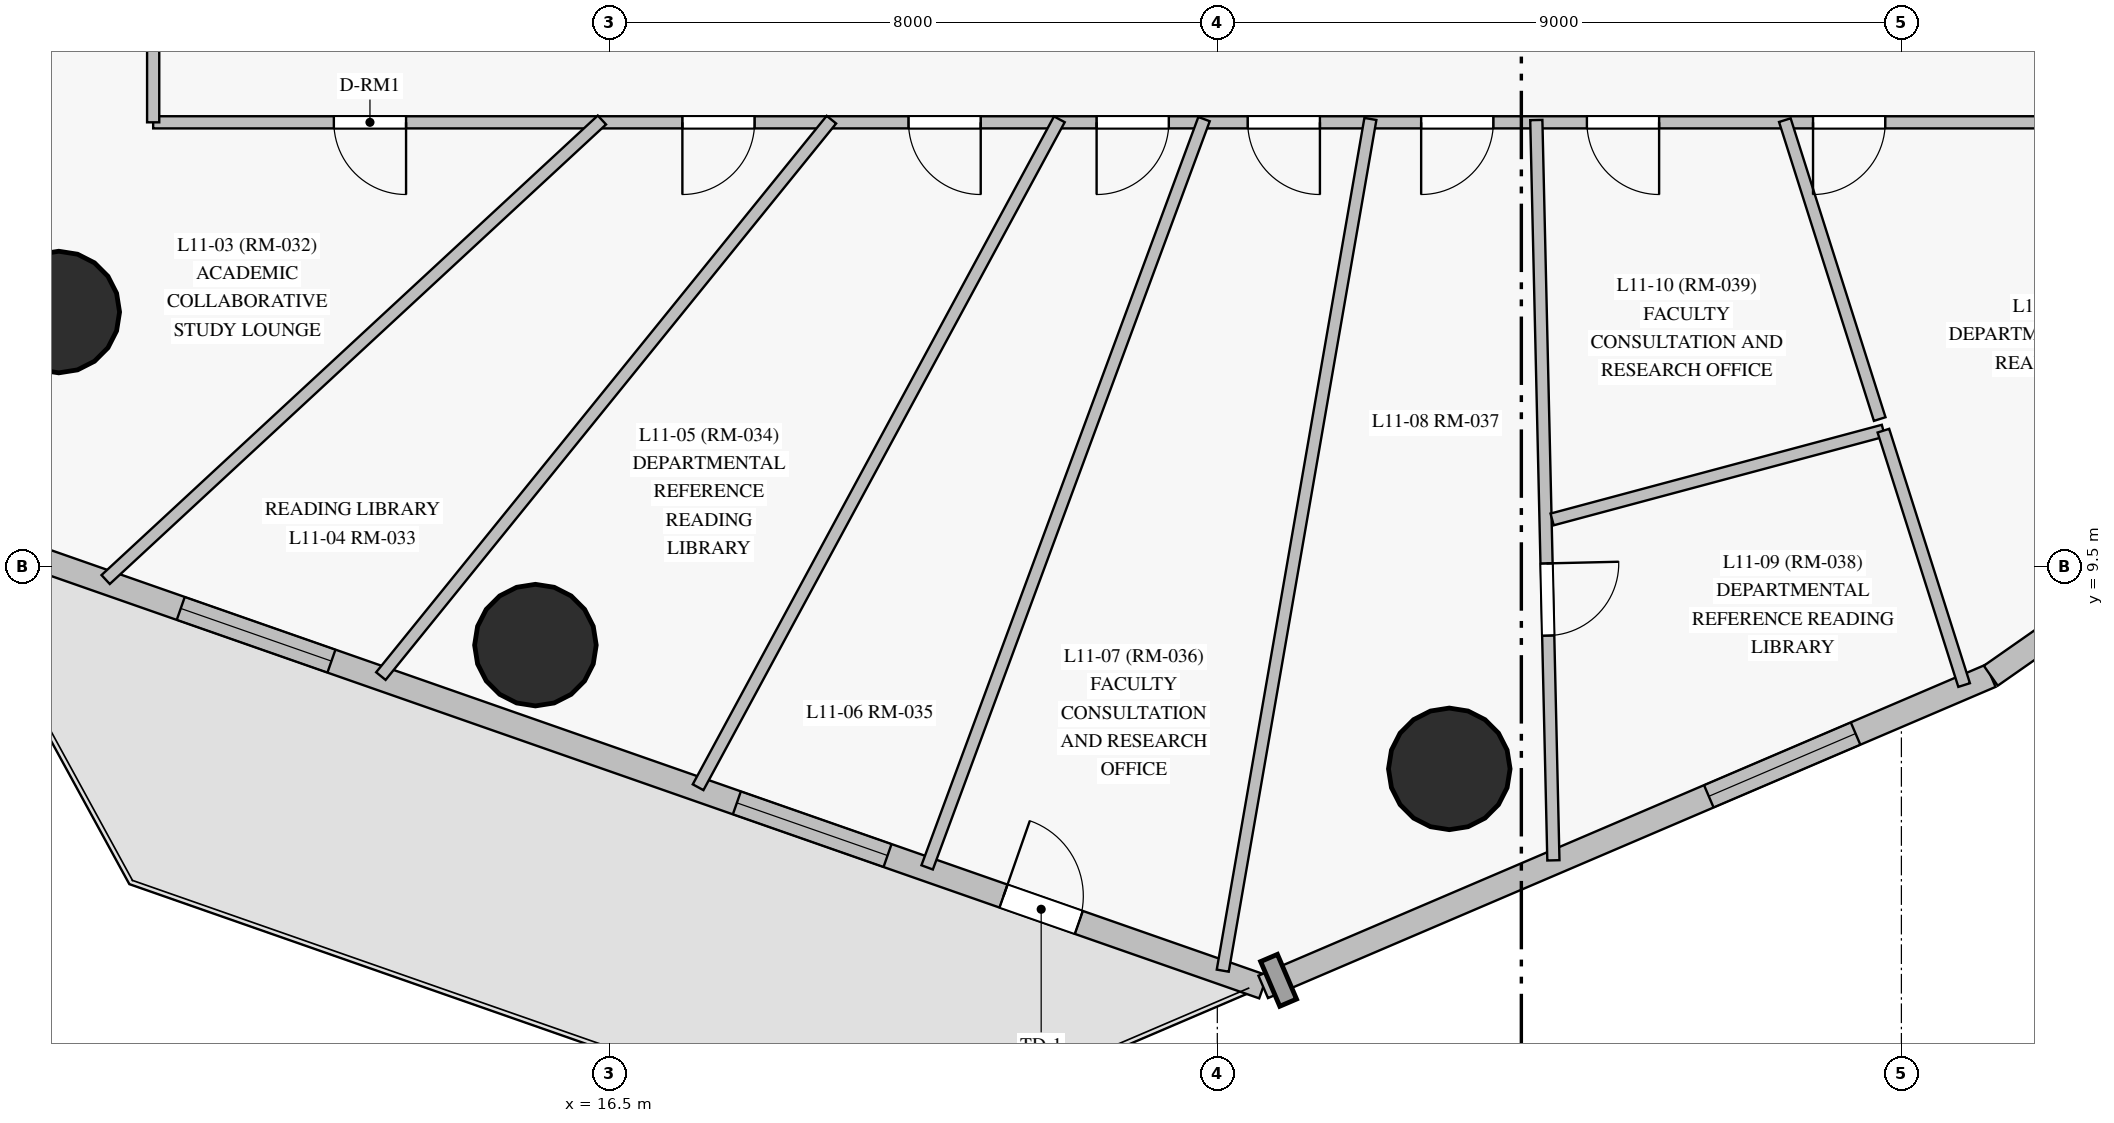
"""IFC4 building model, lengths in metres.
Left out: names, types, materials, properties, quantities, classifications, styles, units other than length and angle.
Written with IfcOpenShell. Run it as: python <this file> out.ifc"""

import sys

from ifc_helpers import new_model, si_unit, direction, frame, frame_2d, origin, origin_with_axes, origin_2d, place, context, subcontext, project, spatial, rectangle, circle, extrude, source, transform, mapped, element, fill, save


model = new_model("IFC4")
c1 = context("Model", 3, precision=1e-05, world=origin(), true_north=direction((0.0, 1.0)))
c2 = subcontext(c1, "Body", "Model", "MODEL_VIEW")
j1 = project(units=[si_unit("LENGTHUNIT", "METRE"), si_unit("PLANEANGLEUNIT", "RADIAN")], contexts=[c1])
p1 = place(None, origin())
s1 = spatial("IfcSite", under=j1, at=p1, CompositionType="ELEMENT")
p2 = place(p1, origin())
s2 = spatial("IfcBuilding", under=s1, at=p2, CompositionType="ELEMENT")
p3 = place(p2, frame((0.0, 0.0, 44.5)))
s3 = spatial("IfcBuildingStorey", under=s2, at=p3, CompositionType="ELEMENT", Elevation=44.5)
m1 = source(origin_with_axes(), c2, "Body", "SweptSolid", [
    extrude(circle(Radius=0.8, at=origin_2d()), origin(), (0.0, 0.0, 1.0), 3.6),
])
for number, where, z_axis, x_axis in (
    (1, (9.258, 12.854, 0.0), (0.0, 0.0, 1.0), (1.0, 0.0, 0.0)),
    (2, (15.529, 8.472, 0.0), (0.0, 0.0, 1.0), (1.0, 0.0, 0.0)),
    (3, (27.552, 6.844, 0.0), (0.0, 0.0, 1.0), (1.0, 0.0, 0.0)),
):
    element("IfcColumn", number, at=place(p3, frame(where, z_axis=z_axis, x_axis=x_axis)), inside=s3, PredefinedType="COLUMN", context=c2, shape_type="MappedRepresentation", body=[
        mapped(m1, transform((0.0, 0.0, 0.0), scale=1.0)),
    ])
p4 = place(p3, frame((7.577, 10.104, 0.0), z_axis=(0.0, 0.0, 1.0), x_axis=(0.943969817427, -0.330031792086, 0.0)))
e4 = element("IfcWall", 4, at=p4, inside=s3, PredefinedType="SOLIDWALL", context=c2, shape_type="SweptSolid", body=[
    extrude(rectangle(XDim=18.568, YDim=0.32, at=frame_2d((9.284, 0.0))), origin(), (0.0, 0.0, 1.0), 3.02),
])
p5 = place(p4, frame((3.481, 0.0, 0.85)))
e5 = element("IfcOpeningElement", 5, at=p5, cuts=e4, PredefinedType="OPENING", context=c2, shape_type="SweptSolid", body=[
    extrude(rectangle(XDim=2.1, YDim=1.95, at=frame_2d((1.05, 0.975))), frame((0.0, 0.17, 0.0), z_axis=(0.0, -1.0, 0.0), x_axis=(1.0, 0.0, 0.0)), (0.0, 0.0, 1.0), 0.34),
])
p6 = place(p4, frame((11.232, 0.0, 0.85)))
e6 = element("IfcOpeningElement", 6, at=p6, cuts=e4, PredefinedType="OPENING", context=c2, shape_type="SweptSolid", body=[
    extrude(rectangle(XDim=2.1, YDim=1.95, at=frame_2d((1.05, 0.975))), frame((0.0, 0.17, 0.0), z_axis=(0.0, -1.0, 0.0), x_axis=(1.0, 0.0, 0.0)), (0.0, 0.0, 1.0), 0.34),
])
p7 = place(p4, frame((14.948, 0.0, 0.0)))
e7 = element("IfcOpeningElement", 7, at=p7, cuts=e4, PredefinedType="OPENING", context=c2, shape_type="SweptSolid", body=[
    extrude(rectangle(XDim=1.05, YDim=2.12, at=frame_2d((0.525, 1.06))), frame((0.0, 0.17, 0.0), z_axis=(0.0, -1.0, 0.0), x_axis=(1.0, 0.0, 0.0)), (0.0, 0.0, 1.0), 0.34),
])
p8 = place(p3, frame((25.104, 3.976, 0.0), z_axis=(0.0, 0.0, 1.0), x_axis=(0.919450427294, 0.393205940634, 0.0)))
e8 = element("IfcWall", 8, at=p8, inside=s3, PredefinedType="SOLIDWALL", context=c2, shape_type="SweptSolid", body=[
    extrude(rectangle(XDim=10.411, YDim=0.32, at=frame_2d((5.205, 0.0))), origin(), (0.0, 0.0, 1.0), 3.02),
])
p9 = place(p8, frame((6.376, 0.0, 0.85)))
e9 = element("IfcOpeningElement", 9, at=p9, cuts=e8, PredefinedType="OPENING", context=c2, shape_type="SweptSolid", body=[
    extrude(rectangle(XDim=2.1, YDim=1.95, at=frame_2d((1.05, 0.975))), frame((0.0, 0.17, 0.0), z_axis=(0.0, -1.0, 0.0), x_axis=(1.0, 0.0, 0.0)), (0.0, 0.0, 1.0), 0.34),
])
p10 = place(p3, frame((34.676, 8.069, 0.0), z_axis=(0.0, 0.0, 1.0), x_axis=(0.81955194261, 0.573004898203, 0.0)))
e10 = element("IfcWall", 10, at=p10, inside=s3, PredefinedType="SOLIDWALL", context=c2, shape_type="SweptSolid", body=[
    extrude(rectangle(XDim=10.999, YDim=0.32, at=frame_2d((5.499, 0.0))), origin(), (0.0, 0.0, 1.0), 3.35),
])
p11 = place(p10, frame((1.036, 0.0, 0.85)))
e11 = element("IfcOpeningElement", 11, at=p11, cuts=e10, PredefinedType="OPENING", context=c2, shape_type="SweptSolid", body=[
    extrude(rectangle(XDim=2.1, YDim=1.95, at=frame_2d((1.05, 0.975))), frame((0.0, 0.17, 0.0), z_axis=(0.0, -1.0, 0.0), x_axis=(1.0, 0.0, 0.0)), (0.0, 0.0, 1.0), 0.34),
])
p12 = place(p10, frame((4.449, 0.0, 0.85)))
e12 = element("IfcOpeningElement", 12, at=p12, cuts=e10, PredefinedType="OPENING", context=c2, shape_type="SweptSolid", body=[
    extrude(rectangle(XDim=2.1, YDim=1.95, at=frame_2d((1.05, 0.975))), frame((0.0, 0.17, 0.0), z_axis=(0.0, -1.0, 0.0), x_axis=(1.0, 0.0, 0.0)), (0.0, 0.0, 1.0), 0.34),
])
p13 = place(p10, frame((7.862, 0.0, 0.85)))
e13 = element("IfcOpeningElement", 13, at=p13, cuts=e10, PredefinedType="OPENING", context=c2, shape_type="SweptSolid", body=[
    extrude(rectangle(XDim=2.1, YDim=1.95, at=frame_2d((1.05, 0.975))), frame((0.0, 0.17, 0.0), z_axis=(0.0, -1.0, 0.0), x_axis=(1.0, 0.0, 0.0)), (0.0, 0.0, 1.0), 0.34),
])
p14 = place(p3, frame((40.25, 15.35, 0.0), z_axis=(0.0, 0.0, 1.0), x_axis=(-1.0, 0.0, 0.0)))
e14 = element("IfcWall", 14, at=p14, inside=s3, PredefinedType="PARTITIONING", context=c2, shape_type="SweptSolid", body=[
    extrude(rectangle(XDim=29.75, YDim=0.16, at=frame_2d((14.875, 0.0))), origin(), (0.0, 0.0, 1.0), 2.7),
])
p15 = place(p14, frame((26.423, 0.0, 0.0)))
e15 = element("IfcOpeningElement", 15, at=p15, cuts=e14, PredefinedType="OPENING", context=c2, shape_type="SweptSolid", body=[
    extrude(rectangle(XDim=0.95, YDim=2.15, at=frame_2d((0.475, 1.075))), frame((0.0, 0.09, 0.0), z_axis=(0.0, -1.0, 0.0), x_axis=(1.0, 0.0, 0.0)), (0.0, 0.0, 1.0), 0.18),
])
p16 = place(p14, frame((21.837, 0.0, 0.0)))
e16 = element("IfcOpeningElement", 16, at=p16, cuts=e14, PredefinedType="OPENING", context=c2, shape_type="SweptSolid", body=[
    extrude(rectangle(XDim=0.95, YDim=2.15, at=frame_2d((0.475, 1.075))), frame((0.0, 0.09, 0.0), z_axis=(0.0, -1.0, 0.0), x_axis=(1.0, 0.0, 0.0)), (0.0, 0.0, 1.0), 0.18),
])
p17 = place(p14, frame((18.863, 0.0, 0.0)))
e17 = element("IfcOpeningElement", 17, at=p17, cuts=e14, PredefinedType="OPENING", context=c2, shape_type="SweptSolid", body=[
    extrude(rectangle(XDim=0.95, YDim=2.15, at=frame_2d((0.475, 1.075))), frame((0.0, 0.09, 0.0), z_axis=(0.0, -1.0, 0.0), x_axis=(1.0, 0.0, 0.0)), (0.0, 0.0, 1.0), 0.18),
])
p18 = place(p14, frame((16.388, 0.0, 0.0)))
e18 = element("IfcOpeningElement", 18, at=p18, cuts=e14, PredefinedType="OPENING", context=c2, shape_type="SweptSolid", body=[
    extrude(rectangle(XDim=0.95, YDim=2.15, at=frame_2d((0.475, 1.075))), frame((0.0, 0.09, 0.0), z_axis=(0.0, -1.0, 0.0), x_axis=(1.0, 0.0, 0.0)), (0.0, 0.0, 1.0), 0.18),
])
p19 = place(p14, frame((14.4, 0.0, 0.0)))
e19 = element("IfcOpeningElement", 19, at=p19, cuts=e14, PredefinedType="OPENING", context=c2, shape_type="SweptSolid", body=[
    extrude(rectangle(XDim=0.95, YDim=2.15, at=frame_2d((0.475, 1.075))), frame((0.0, 0.09, 0.0), z_axis=(0.0, -1.0, 0.0), x_axis=(1.0, 0.0, 0.0)), (0.0, 0.0, 1.0), 0.18),
])
p20 = place(p14, frame((12.118, 0.0, 0.0)))
e20 = element("IfcOpeningElement", 20, at=p20, cuts=e14, PredefinedType="OPENING", context=c2, shape_type="SweptSolid", body=[
    extrude(rectangle(XDim=0.95, YDim=2.15, at=frame_2d((0.475, 1.075))), frame((0.0, 0.09, 0.0), z_axis=(0.0, -1.0, 0.0), x_axis=(1.0, 0.0, 0.0)), (0.0, 0.0, 1.0), 0.18),
])
p21 = place(p14, frame((9.938, 0.0, 0.0)))
e21 = element("IfcOpeningElement", 21, at=p21, cuts=e14, PredefinedType="OPENING", context=c2, shape_type="SweptSolid", body=[
    extrude(rectangle(XDim=0.95, YDim=2.15, at=frame_2d((0.475, 1.075))), frame((0.0, 0.09, 0.0), z_axis=(0.0, -1.0, 0.0), x_axis=(1.0, 0.0, 0.0)), (0.0, 0.0, 1.0), 0.18),
])
p22 = place(p14, frame((6.962, 0.0, 0.0)))
e22 = element("IfcOpeningElement", 22, at=p22, cuts=e14, PredefinedType="OPENING", context=c2, shape_type="SweptSolid", body=[
    extrude(rectangle(XDim=0.95, YDim=2.15, at=frame_2d((0.475, 1.075))), frame((0.0, 0.09, 0.0), z_axis=(0.0, -1.0, 0.0), x_axis=(1.0, 0.0, 0.0)), (0.0, 0.0, 1.0), 0.18),
])
p23 = place(p3, frame((10.5, 15.35, 0.0), z_axis=(0.0, 0.0, 1.0), x_axis=(0.0, 1.0, 0.0)))
e23 = element("IfcWall", 23, at=p23, inside=s3, PredefinedType="PARTITIONING", context=c2, shape_type="SweptSolid", body=[
    extrude(rectangle(XDim=22.3, YDim=0.16, at=frame_2d((11.15, 0.0))), origin(), (0.0, 0.0, 1.0), 2.75),
])
p24 = place(p23, frame((10.035, 0.0, 0.0)))
e24 = element("IfcOpeningElement", 24, at=p24, cuts=e23, PredefinedType="OPENING", context=c2, shape_type="SweptSolid", body=[
    extrude(rectangle(XDim=0.95, YDim=2.15, at=frame_2d((0.475, 1.075))), frame((0.0, 0.09, 0.0), z_axis=(0.0, -1.0, 0.0), x_axis=(1.0, 0.0, 0.0)), (0.0, 0.0, 1.0), 0.18),
])
p25 = place(p23, frame((3.031, 0.0, 0.0)))
e25 = element("IfcOpeningElement", 25, at=p25, cuts=e23, PredefinedType="OPENING", context=c2, shape_type="SweptSolid", body=[
    extrude(rectangle(XDim=0.96, YDim=2.15, at=frame_2d((0.48, 1.075))), frame((0.0, 0.09, 0.0), z_axis=(0.0, -1.0, 0.0), x_axis=(1.0, 0.0, 0.0)), (0.0, 0.0, 1.0), 0.18),
])
p26 = place(p23, frame((16.25, 0.0, 0.0)))
e26 = element("IfcOpeningElement", 26, at=p26, cuts=e23, PredefinedType="OPENING", context=c2, shape_type="SweptSolid", body=[
    extrude(rectangle(XDim=0.95, YDim=2.15, at=frame_2d((0.475, 1.075))), frame((0.0, 0.09, 0.0), z_axis=(0.0, -1.0, 0.0), x_axis=(1.0, 0.0, 0.0)), (0.0, 0.0, 1.0), 0.18),
])
p27 = place(p23, frame((12.443, 0.0, 0.0)))
e27 = element("IfcOpeningElement", 27, at=p27, cuts=e23, PredefinedType="OPENING", context=c2, shape_type="SweptSolid", body=[
    extrude(rectangle(XDim=0.95, YDim=2.15, at=frame_2d((0.475, 1.075))), frame((0.0, 0.09, 0.0), z_axis=(0.0, -1.0, 0.0), x_axis=(1.0, 0.0, 0.0)), (0.0, 0.0, 1.0), 0.18),
])
p28 = place(p3, frame((26.514, 15.394, 0.0), z_axis=(0.0, 0.0, 1.0), x_axis=(-0.170801173995, -0.985305515544, 0.0)))
e28 = element("IfcWall", 28, at=p28, inside=s3, PredefinedType="PARTITIONING", context=c2, shape_type="SweptSolid", body=[
    extrude(rectangle(XDim=11.372, YDim=0.16, at=frame_2d((5.686, 0.0))), origin(), (0.0, 0.0, 1.0), 2.7),
])
p29 = place(p3, frame((24.325, 15.392, 0.0), z_axis=(0.0, 0.0, 1.0), x_axis=(-0.347054504225, -0.937844961119, 0.0)))
e29 = element("IfcWall", 29, at=p29, inside=s3, PredefinedType="PARTITIONING", context=c2, shape_type="SweptSolid", body=[
    extrude(rectangle(XDim=10.496, YDim=0.16, at=frame_2d((5.248, 0.0))), origin(), (0.0, 0.0, 1.0), 3.35),
])
p30 = place(p3, frame((22.422, 15.39, 0.0), z_axis=(0.0, 0.0, 1.0), x_axis=(-0.47575009299, -0.879580496044, 0.0)))
e30 = element("IfcWall", 30, at=p30, inside=s3, PredefinedType="PARTITIONING", context=c2, shape_type="SweptSolid", body=[
    extrude(rectangle(XDim=9.99, YDim=0.16, at=frame_2d((4.995, 0.0))), origin(), (0.0, 0.0, 1.0), 3.35),
])
p31 = place(p3, frame((28.697, 15.38, 0.0), z_axis=(0.0, 0.0, 1.0), x_axis=(0.023081185201, -0.999733593959, 0.0)))
e31 = element("IfcWall", 31, at=p31, inside=s3, PredefinedType="PARTITIONING", context=c2, shape_type="SweptSolid", body=[
    extrude(rectangle(XDim=9.742, YDim=0.16, at=frame_2d((4.871, 0.0))), origin(), (0.0, 0.0, 1.0), 3.35),
])
p32 = place(p31, frame((5.834, 0.0, 0.0)))
e32 = element("IfcOpeningElement", 32, at=p32, cuts=e31, PredefinedType="OPENING", context=c2, shape_type="SweptSolid", body=[
    extrude(rectangle(XDim=0.95, YDim=2.15, at=frame_2d((0.475, 1.075))), frame((0.0, 0.09, 0.0), z_axis=(0.0, -1.0, 0.0), x_axis=(1.0, 0.0, 0.0)), (0.0, 0.0, 1.0), 0.18),
])
p33 = place(p3, frame((19.423, 15.385, 0.0), z_axis=(0.0, 0.0, 1.0), x_axis=(-0.629280245268, -0.777178469153, 0.0)))
e33 = element("IfcWall", 33, at=p33, inside=s3, PredefinedType="PARTITIONING", context=c2, shape_type="SweptSolid", body=[
    extrude(rectangle(XDim=9.419, YDim=0.16, at=frame_2d((4.709, 0.0))), origin(), (0.0, 0.0, 1.0), 2.7),
])
p34 = place(p3, frame((16.404, 15.381, 0.0), z_axis=(0.0, 0.0, 1.0), x_axis=(-0.733733824599, -0.679437027722, 0.0)))
e34 = element("IfcWall", 34, at=p34, inside=s3, PredefinedType="PARTITIONING", context=c2, shape_type="SweptSolid", body=[
    extrude(rectangle(XDim=8.898, YDim=0.16, at=frame_2d((4.449, 0.0))), origin(), (0.0, 0.0, 1.0), 3.35),
])
p35 = place(p3, frame((10.54, 17.416, 0.0), z_axis=(0.0, 0.0, 1.0), x_axis=(-0.890998767968, -0.454005721857, 0.0)))
e35 = element("IfcWall", 35, at=p35, inside=s3, PredefinedType="PARTITIONING", context=c2, shape_type="SweptSolid", body=[
    extrude(rectangle(XDim=6.085, YDim=0.16, at=frame_2d((3.042, 0.0))), origin(), (0.0, 0.0, 1.0), 3.35),
])
p36 = place(p3, frame((28.905, 10.126, 0.0), z_axis=(0.0, 0.0, 1.0), x_axis=(0.965928004667, 0.258810915149, 0.0)))
e36 = element("IfcWall", 36, at=p36, inside=s3, PredefinedType="PARTITIONING", context=c2, shape_type="SweptSolid", body=[
    extrude(rectangle(XDim=4.512, YDim=0.16, at=frame_2d((2.256, 0.0))), origin(), (0.0, 0.0, 1.0), 2.75),
])
p37 = place(p3, frame((31.967, 15.379, 0.0), z_axis=(0.0, 0.0, 1.0), x_axis=(0.302490392513, -0.953152433999, 0.0)))
e37 = element("IfcWall", 37, at=p37, inside=s3, PredefinedType="PARTITIONING", context=c2, shape_type="SweptSolid", body=[
    extrude(rectangle(XDim=4.126, YDim=0.16, at=frame_2d((2.063, 0.0))), origin(), (0.0, 0.0, 1.0), 3.35),
])
p38 = place(p3, frame((33.263, 11.293, 0.0), z_axis=(0.0, 0.0, 1.0), x_axis=(0.302468838767, -0.953159273981, 0.0)))
e38 = element("IfcWall", 38, at=p38, inside=s3, PredefinedType="PARTITIONING", context=c2, shape_type="SweptSolid", body=[
    extrude(rectangle(XDim=3.511, YDim=0.16, at=frame_2d((1.756, 0.0))), origin(), (0.0, 0.0, 1.0), 3.35),
])
m2 = source(origin_with_axes(), c2, "Body", "SweptSolid", [
    extrude(rectangle(XDim=2.1, YDim=1.95, at=frame_2d((1.05, 0.975))), frame((0.0, 0.03, 0.0), z_axis=(0.0, -1.0, 0.0), x_axis=(1.0, 0.0, 0.0)), (0.0, 0.0, 1.0), 0.06),
])
p39 = place(p5, origin())
e39 = element("IfcWindow", 39, at=p39, inside=s3, PartitioningType="SINGLE_PANEL", PredefinedType="WINDOW", context=c2, shape_type="MappedRepresentation", body=[
    mapped(m2, transform((0.0, 0.0, 0.0), scale=1.0)),
])
fill(e5, e39)
p40 = place(p6, origin())
e40 = element("IfcWindow", 40, at=p40, inside=s3, PartitioningType="SINGLE_PANEL", PredefinedType="WINDOW", context=c2, shape_type="MappedRepresentation", body=[
    mapped(m2, transform((0.0, 0.0, 0.0), scale=1.0)),
])
fill(e6, e40)
p41 = place(p9, origin())
e41 = element("IfcWindow", 41, at=p41, inside=s3, PartitioningType="SINGLE_PANEL", PredefinedType="WINDOW", context=c2, shape_type="MappedRepresentation", body=[
    mapped(m2, transform((0.0, 0.0, 0.0), scale=1.0)),
])
fill(e9, e41)
m3 = source(origin_with_axes(), c2, "Body", "SweptSolid", [
    extrude(rectangle(XDim=1.05, YDim=2.12, at=frame_2d((0.525, 1.06))), frame((0.0, 0.025, 0.0), z_axis=(0.0, -1.0, 0.0), x_axis=(1.0, 0.0, 0.0)), (0.0, 0.0, 1.0), 0.05),
])
p42 = place(p7, origin())
e42 = element("IfcDoor", 42, at=p42, inside=s3, OperationType="SINGLE_SWING_LEFT", PredefinedType="DOOR", context=c2, shape_type="MappedRepresentation", body=[
    mapped(m3, transform((0.0, 0.0, 0.0), scale=1.0)),
])
fill(e7, e42)
m4 = source(origin_with_axes(), c2, "Body", "SweptSolid", [
    extrude(rectangle(XDim=0.95, YDim=2.15, at=frame_2d((0.475, 1.075))), frame((0.0, 0.025, 0.0), z_axis=(0.0, -1.0, 0.0), x_axis=(1.0, 0.0, 0.0)), (0.0, 0.0, 1.0), 0.05),
])
p43 = place(p15, origin())
e43 = element("IfcDoor", 43, at=p43, inside=s3, OperationType="SINGLE_SWING_LEFT", PredefinedType="DOOR", context=c2, shape_type="MappedRepresentation", body=[
    mapped(m4, transform((0.0, 0.0, 0.0), scale=1.0)),
])
fill(e15, e43)
p44 = place(p16, origin())
e44 = element("IfcDoor", 44, at=p44, inside=s3, OperationType="SINGLE_SWING_RIGHT", PredefinedType="DOOR", context=c2, shape_type="MappedRepresentation", body=[
    mapped(m4, transform((0.0, 0.0, 0.0), scale=1.0)),
])
fill(e16, e44)
p45 = place(p17, origin())
e45 = element("IfcDoor", 45, at=p45, inside=s3, OperationType="SINGLE_SWING_LEFT", PredefinedType="DOOR", context=c2, shape_type="MappedRepresentation", body=[
    mapped(m4, transform((0.0, 0.0, 0.0), scale=1.0)),
])
fill(e17, e45)
p46 = place(p18, origin())
e46 = element("IfcDoor", 46, at=p46, inside=s3, OperationType="SINGLE_SWING_RIGHT", PredefinedType="DOOR", context=c2, shape_type="MappedRepresentation", body=[
    mapped(m4, transform((0.0, 0.0, 0.0), scale=1.0)),
])
fill(e18, e46)
p47 = place(p19, origin())
e47 = element("IfcDoor", 47, at=p47, inside=s3, OperationType="SINGLE_SWING_LEFT", PredefinedType="DOOR", context=c2, shape_type="MappedRepresentation", body=[
    mapped(m4, transform((0.0, 0.0, 0.0), scale=1.0)),
])
fill(e19, e47)
p48 = place(p20, origin())
e48 = element("IfcDoor", 48, at=p48, inside=s3, OperationType="SINGLE_SWING_RIGHT", PredefinedType="DOOR", context=c2, shape_type="MappedRepresentation", body=[
    mapped(m4, transform((0.0, 0.0, 0.0), scale=1.0)),
])
fill(e20, e48)
p49 = place(p21, origin())
e49 = element("IfcDoor", 49, at=p49, inside=s3, OperationType="SINGLE_SWING_LEFT", PredefinedType="DOOR", context=c2, shape_type="MappedRepresentation", body=[
    mapped(m4, transform((0.0, 0.0, 0.0), scale=1.0)),
])
fill(e21, e49)
p50 = place(p22, origin())
e50 = element("IfcDoor", 50, at=p50, inside=s3, OperationType="SINGLE_SWING_RIGHT", PredefinedType="DOOR", context=c2, shape_type="MappedRepresentation", body=[
    mapped(m4, transform((0.0, 0.0, 0.0), scale=1.0)),
])
fill(e22, e50)
p51 = place(p32, origin())
e51 = element("IfcDoor", 51, at=p51, inside=s3, OperationType="SINGLE_SWING_LEFT", PredefinedType="DOOR", context=c2, shape_type="MappedRepresentation", body=[
    mapped(m4, transform((0.0, 0.0, 0.0), scale=1.0)),
])
fill(e32, e51)
save(model, sys.argv[1])
